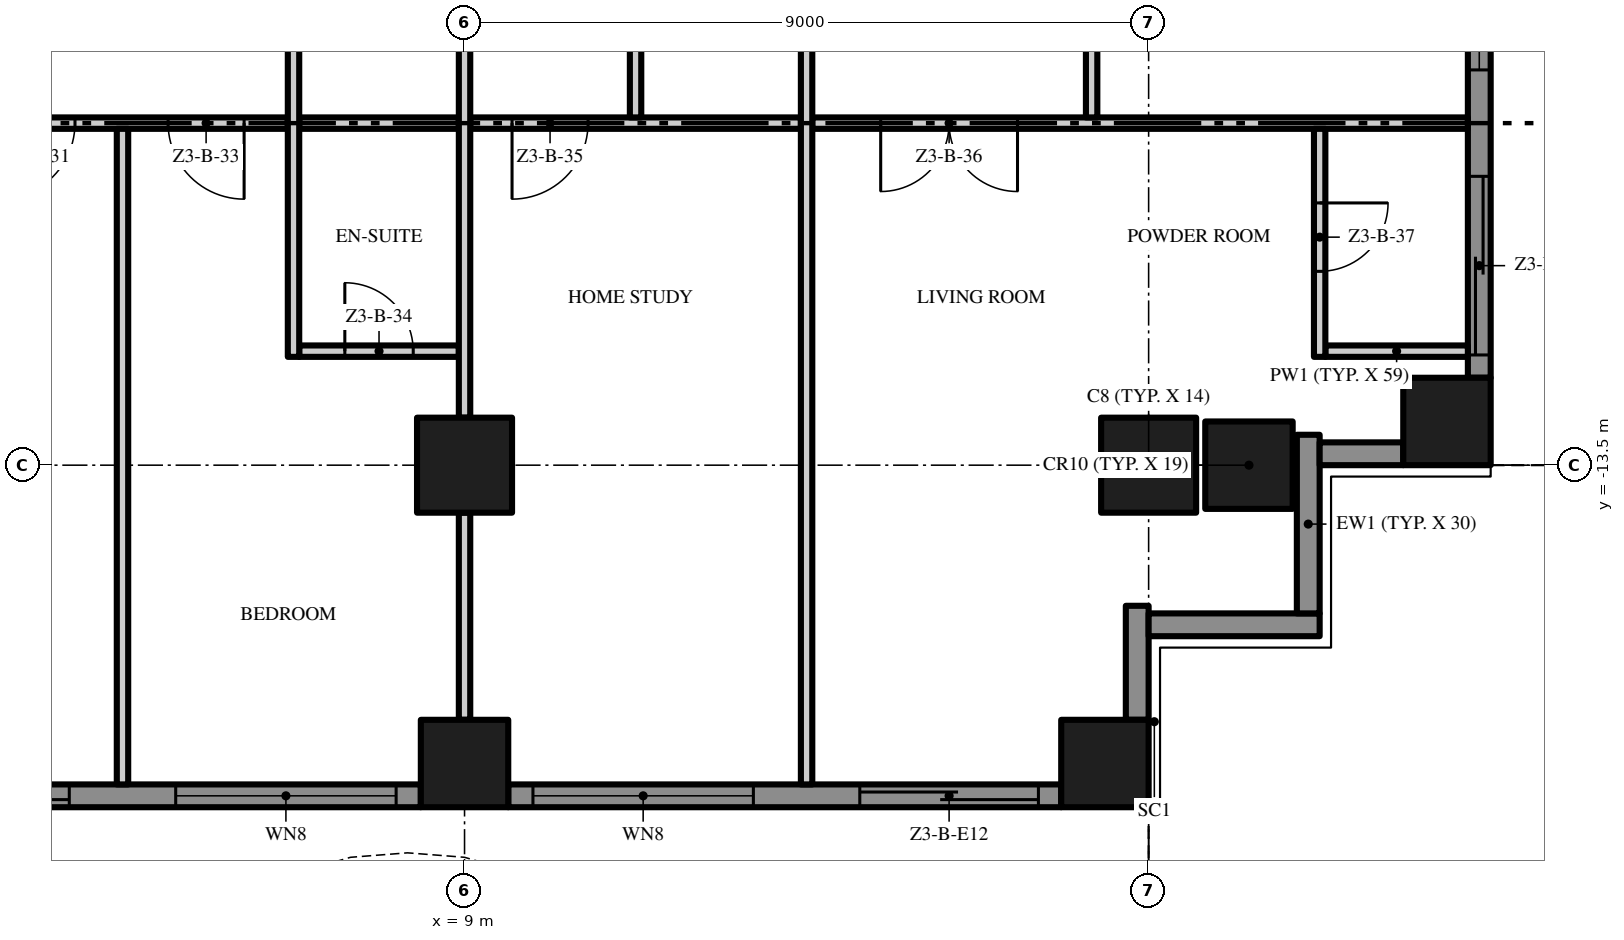
"""IFC4 building model, lengths in metres.
Left out: names, types, materials, properties, quantities, classifications, styles, units other than length and angle.
Written with IfcOpenShell. Run it as: python <this file> out.ifc"""

import sys

from ifc_helpers import new_model, si_unit, direction, frame, frame_2d, origin, origin_2d, place, context, subcontext, project, spatial, polyline, rectangle, outline, extrude, element, fill, save


model = new_model("IFC4")
c1 = context("Model", 3, precision=1e-05, world=origin(), true_north=direction((0.0, 1.0)))
c2 = subcontext(c1, "Body", "Model", "MODEL_VIEW")
j1 = project(units=[si_unit("LENGTHUNIT", "METRE"), si_unit("PLANEANGLEUNIT", "RADIAN")], contexts=[c1])
p1 = place(None, origin())
s1 = spatial("IfcSite", under=j1, at=p1, CompositionType="ELEMENT")
p2 = place(p1, origin())
s2 = spatial("IfcBuilding", under=s1, at=p2, CompositionType="ELEMENT")
p3 = place(p2, frame((0.0, 0.0, 144.0)))
s3 = spatial("IfcBuildingStorey", under=s2, at=p3, CompositionType="ELEMENT", Elevation=144.0)
p4 = place(p3, frame((18.0, -13.5, 0.0), z_axis=(0.0, 0.0, 1.0), x_axis=(1.0, 0.0, 0.0)))
e1 = element("IfcColumn", 1, at=p4, inside=s3, PredefinedType="COLUMN", context=c2, shape_type="SweptSolid", body=[
    extrude(rectangle(XDim=1.25, YDim=1.25, at=origin_2d()), origin(), (0.0, 0.0, 1.0), 3.5),
])
for number, where, z_axis, x_axis in (
    (2, (17.425, -17.425, 0.0), (0.0, 0.0, 1.0), (1.0, 0.0, 0.0)),
    (3, (21.925, -12.925, 0.0), (0.0, 0.0, 1.0), (1.0, 0.0, 0.0)),
    (4, (19.32, -13.5, 0.0), (0.0, 0.0, 1.0), (1.0, 0.0, 0.0)),
):
    element("IfcColumn", number, at=place(p3, frame(where, z_axis=z_axis, x_axis=x_axis)), inside=s3, PredefinedType="COLUMN", context=c2, shape_type="SweptSolid", body=[
        extrude(rectangle(XDim=1.15, YDim=1.15, at=origin_2d()), origin(), (0.0, 0.0, 1.0), 3.5),
    ])
p5 = place(p3, frame((9.0, -13.5, 0.0), z_axis=(0.0, 0.0, 1.0), x_axis=(1.0, 0.0, 0.0)))
e5 = element("IfcColumn", 5, at=p5, inside=s3, PredefinedType="COLUMN", context=c2, shape_type="SweptSolid", body=[
    extrude(rectangle(XDim=1.25, YDim=1.25, at=origin_2d()), origin(), (0.0, 0.0, 1.0), 3.5),
])
p6 = place(p3, frame((9.0, -17.425, 0.0), z_axis=(0.0, 0.0, 1.0), x_axis=(1.0, 0.0, 0.0)))
e6 = element("IfcColumn", 6, at=p6, inside=s3, PredefinedType="COLUMN", context=c2, shape_type="SweptSolid", body=[
    extrude(rectangle(XDim=1.15, YDim=1.15, at=origin_2d()), origin(), (0.0, 0.0, 1.0), 3.5),
])
p7 = place(p3, frame((8.425, -17.85, 0.0), z_axis=(0.0, 0.0, 1.0), x_axis=(-1.0, 0.0, 0.0)))
e7 = element("IfcWall", 7, at=p7, inside=s3, PredefinedType="SOLIDWALL", context=c2, shape_type="SweptSolid", body=[
    extrude(rectangle(XDim=7.85, YDim=0.3, at=frame_2d((3.925, 0.0))), origin(), (0.0, 0.0, 1.0), 3.5),
])
p8 = place(p7, frame((4.625, 0.0, 0.0)))
e8 = element("IfcOpeningElement", 8, at=p8, cuts=e7, PredefinedType="OPENING", context=c2, shape_type="SweptSolid", body=[
    extrude(rectangle(XDim=2.9, YDim=2.4, at=frame_2d((1.45, 1.2))), frame((0.0, 0.16, 0.0), z_axis=(0.0, -1.0, 0.0), x_axis=(1.0, 0.0, 0.0)), (0.0, 0.0, 1.0), 0.32),
])
p9 = place(p7, frame((0.325, 0.0, 0.45)))
e9 = element("IfcOpeningElement", 9, at=p9, cuts=e7, PredefinedType="OPENING", context=c2, shape_type="SweptSolid", body=[
    extrude(rectangle(XDim=2.9, YDim=2.65, at=frame_2d((1.45, 1.325))), frame((0.0, 0.16, 0.0), z_axis=(0.0, -1.0, 0.0), x_axis=(1.0, 0.0, 0.0)), (0.0, 0.0, 1.0), 0.32),
])
p10 = place(p3, frame((16.85, -17.85, 0.0), z_axis=(0.0, 0.0, 1.0), x_axis=(-1.0, 0.0, 0.0)))
e10 = element("IfcWall", 10, at=p10, inside=s3, PredefinedType="SOLIDWALL", context=c2, shape_type="SweptSolid", body=[
    extrude(rectangle(XDim=7.275, YDim=0.3, at=frame_2d((3.638, 0.0))), origin(), (0.0, 0.0, 1.0), 3.5),
])
p11 = place(p10, frame((4.05, 0.0, 0.45)))
e11 = element("IfcOpeningElement", 11, at=p11, cuts=e10, PredefinedType="OPENING", context=c2, shape_type="SweptSolid", body=[
    extrude(rectangle(XDim=2.9, YDim=2.65, at=frame_2d((1.45, 1.325))), frame((0.0, 0.16, 0.0), z_axis=(0.0, -1.0, 0.0), x_axis=(1.0, 0.0, 0.0)), (0.0, 0.0, 1.0), 0.32),
])
p12 = place(p10, frame((0.3, 0.0, 0.0)))
e12 = element("IfcOpeningElement", 12, at=p12, cuts=e10, PredefinedType="OPENING", context=c2, shape_type="SweptSolid", body=[
    extrude(rectangle(XDim=2.35, YDim=2.4, at=frame_2d((1.175, 1.2))), frame((0.0, 0.16, 0.0), z_axis=(0.0, -1.0, 0.0), x_axis=(1.0, 0.0, 0.0)), (0.0, 0.0, 1.0), 0.32),
])
p13 = place(p3, frame((17.85, -15.35, 0.0), z_axis=(0.0, 0.0, 1.0), x_axis=(0.0, -1.0, 0.0)))
e13 = element("IfcWall", 13, at=p13, inside=s3, PredefinedType="SOLIDWALL", context=c2, shape_type="SweptSolid", body=[
    extrude(rectangle(XDim=1.5, YDim=0.3, at=frame_2d((0.75, 0.0))), origin(), (0.0, 0.0, 1.0), 3.5),
])
p14 = place(p3, frame((20.25, -15.6, 0.0), z_axis=(0.0, 0.0, 1.0), x_axis=(-1.0, 0.0, 0.0)))
e14 = element("IfcWall", 14, at=p14, inside=s3, PredefinedType="SOLIDWALL", context=c2, shape_type="SweptSolid", body=[
    extrude(rectangle(XDim=2.25, YDim=0.3, at=frame_2d((1.125, 0.0))), origin(), (0.0, 0.0, 1.0), 3.5),
])
p15 = place(p3, frame((20.1, -13.1, 0.0), z_axis=(0.0, 0.0, 1.0), x_axis=(0.0, -1.0, 0.0)))
e15 = element("IfcWall", 15, at=p15, inside=s3, PredefinedType="SOLIDWALL", context=c2, shape_type="SweptSolid", body=[
    extrude(rectangle(XDim=2.35, YDim=0.3, at=frame_2d((1.175, 0.0))), origin(), (0.0, 0.0, 1.0), 3.5),
])
p16 = place(p3, frame((21.35, -13.35, 0.0), z_axis=(0.0, 0.0, 1.0), x_axis=(-1.0, 0.0, 0.0)))
e16 = element("IfcWall", 16, at=p16, inside=s3, PredefinedType="SOLIDWALL", context=c2, shape_type="SweptSolid", body=[
    extrude(rectangle(XDim=1.1, YDim=0.3, at=frame_2d((0.55, 0.0))), origin(), (0.0, 0.0, 1.0), 3.5),
])
p17 = place(p3, frame((22.35, -5.075, 0.0), z_axis=(0.0, 0.0, 1.0), x_axis=(0.0, -1.0, 0.0)))
e17 = element("IfcWall", 17, at=p17, inside=s3, PredefinedType="SOLIDWALL", context=c2, shape_type="SweptSolid", body=[
    extrude(rectangle(XDim=7.275, YDim=0.3, at=frame_2d((3.638, 0.0))), origin(), (0.0, 0.0, 1.0), 3.5),
])
p18 = place(p17, frame((4.625, 0.0, 0.0)))
e18 = element("IfcOpeningElement", 18, at=p18, cuts=e17, PredefinedType="OPENING", context=c2, shape_type="SweptSolid", body=[
    extrude(rectangle(XDim=2.35, YDim=2.4, at=frame_2d((1.175, 1.2))), frame((0.0, 0.16, 0.0), z_axis=(0.0, -1.0, 0.0), x_axis=(1.0, 0.0, 0.0)), (0.0, 0.0, 1.0), 0.32),
])
p19 = place(p17, frame((0.325, 0.0, 0.45)))
e19 = element("IfcOpeningElement", 19, at=p19, cuts=e17, PredefinedType="OPENING", context=c2, shape_type="SweptSolid", body=[
    extrude(rectangle(XDim=2.9, YDim=2.65, at=frame_2d((1.45, 1.325))), frame((0.0, 0.16, 0.0), z_axis=(0.0, -1.0, 0.0), x_axis=(1.0, 0.0, 0.0)), (0.0, 0.0, 1.0), 0.32),
])
p20 = place(p3, origin())
e20 = element("IfcWall", 20, at=p20, inside=s3, PredefinedType="USERDEFINED", context=c2, shape_type="SweptSolid", body=[
    extrude(outline(polyline([(-18.0, -19.8), (-16.5, -20.505), (-15.0, -20.941), (-14.25, -21.0), (-13.5, -20.941), (-12.0, -20.505), (-10.5, -19.8), (-9.0, -19.095), (-7.5, -18.659), (-6.75, -18.6), (-6.0, -18.659), (-4.5, -19.095), (-3.0, -19.8), (-1.5, -20.505), (0.0, -20.941), (0.75, -21.0), (1.5, -20.941), (3.0, -20.505), (4.5, -19.8), (6.0, -19.095), (7.5, -18.659), (8.25, -18.6), (9.0, -18.659), (10.5, -19.095), (12.0, -19.8), (13.5, -20.505), (15.0, -20.941), (15.75, -21.0), (16.5, -20.941), (18.0, -20.505), (17.93, -20.265), (16.455, -20.694), (15.75, -20.749), (15.045, -20.694), (13.589, -20.271), (12.106, -19.574), (10.589, -18.86), (9.045, -18.411), (8.25, -18.349), (7.455, -18.411), (5.911, -18.86), (4.394, -19.574), (2.911, -20.271), (1.455, -20.694), (0.75, -20.749), (0.045, -20.694), (-1.411, -20.271), (-2.894, -19.574), (-4.411, -18.86), (-5.955, -18.411), (-6.75, -18.349), (-7.545, -18.411), (-9.089, -18.86), (-10.606, -19.574), (-12.089, -20.271), (-13.545, -20.694), (-14.25, -20.749), (-14.955, -20.694), (-16.411, -20.271), (-17.894, -19.574), (-18.0, -19.8)])), origin(), (0.0, 0.0, 1.0), 0.9),
])
p21 = place(p3, origin())
e21 = element("IfcWall", 21, at=p21, inside=s3, PredefinedType="USERDEFINED", context=c2, shape_type="SweptSolid", body=[
    extrude(outline(polyline([(24.3, -13.5), (25.005, -12.0), (25.441, -10.5), (25.5, -9.75), (25.441, -9.0), (25.005, -7.5), (24.3, -6.0), (23.595, -4.5), (23.159, -3.0), (23.1, -2.25), (23.159, -1.5), (23.595, 0.0), (24.3, 1.5), (25.005, 3.0), (25.441, 4.5), (25.5, 5.25), (25.441, 6.0), (25.005, 7.5), (24.3, 9.0), (23.595, 10.5), (23.159, 12.0), (23.1, 12.75), (23.159, 13.5), (23.595, 15.0), (24.3, 16.5), (25.005, 18.0), (24.779, 18.106), (24.074, 16.606), (23.36, 15.089), (22.911, 13.545), (22.849, 12.75), (22.911, 11.955), (23.36, 10.411), (24.074, 8.894), (24.771, 7.411), (25.194, 5.955), (25.249, 5.25), (25.194, 4.545), (24.771, 3.089), (24.074, 1.606), (23.36, 0.089), (22.911, -1.455), (22.849, -2.25), (22.911, -3.045), (23.36, -4.589), (24.074, -6.106), (24.771, -7.589), (25.194, -9.045), (25.249, -9.75), (25.194, -10.455), (24.771, -11.911), (24.074, -13.394), (24.3, -13.5)])), origin(), (0.0, 0.0, 1.0), 0.9),
])
p22 = place(p3, frame((6.825, -12.0, 0.0), z_axis=(0.0, 0.0, 1.0), x_axis=(1.0, 0.0, 0.0)))
e22 = element("IfcWall", 22, at=p22, inside=s3, PredefinedType="PARTITIONING", context=c2, shape_type="SweptSolid", body=[
    extrude(rectangle(XDim=2.1, YDim=0.15, at=frame_2d((1.05, 0.0))), origin(), (0.0, 0.0, 1.0), 3.5),
])
p23 = place(p22, frame((0.6, 0.0, 0.0)))
e23 = element("IfcOpeningElement", 23, at=p23, cuts=e22, PredefinedType="OPENING", context=c2, shape_type="SweptSolid", body=[
    extrude(rectangle(XDim=0.9, YDim=2.1, at=frame_2d((0.45, 1.05))), frame((0.0, 0.085, 0.0), z_axis=(0.0, -1.0, 0.0), x_axis=(1.0, 0.0, 0.0)), (0.0, 0.0, 1.0), 0.17),
])
p24 = place(p3, frame((20.325, -12.0, 0.0), z_axis=(0.0, 0.0, 1.0), x_axis=(1.0, 0.0, 0.0)))
e24 = element("IfcWall", 24, at=p24, inside=s3, PredefinedType="PARTITIONING", context=c2, shape_type="SweptSolid", body=[
    extrude(rectangle(XDim=1.875, YDim=0.15, at=frame_2d((0.938, 0.0))), origin(), (0.0, 0.0, 1.0), 3.5),
])
p25 = place(p3, frame((6.675, -9.0, 0.0), z_axis=(0.0, 0.0, 1.0), x_axis=(-1.0, 0.0, 0.0)))
e25 = element("IfcWall", 25, at=p25, inside=s3, PredefinedType="PARTITIONING", context=c2, shape_type="SweptSolid", body=[
    extrude(rectangle(XDim=4.35, YDim=0.15, at=frame_2d((2.175, 0.0))), origin(), (0.0, 0.0, 1.0), 3.5),
])
p26 = place(p25, frame((2.8, 0.0, 0.0)))
e26 = element("IfcOpeningElement", 26, at=p26, cuts=e25, PredefinedType="OPENING", context=c2, shape_type="SweptSolid", body=[
    extrude(rectangle(XDim=1.0, YDim=2.4, at=frame_2d((0.5, 1.2))), frame((0.0, 0.085, 0.0), z_axis=(0.0, -1.0, 0.0), x_axis=(1.0, 0.0, 0.0)), (0.0, 0.0, 1.0), 0.17),
])
p27 = place(p25, frame((0.575, 0.0, 0.0)))
e27 = element("IfcOpeningElement", 27, at=p27, cuts=e25, PredefinedType="OPENING", context=c2, shape_type="SweptSolid", body=[
    extrude(rectangle(XDim=1.0, YDim=2.4, at=frame_2d((0.5, 1.2))), frame((0.0, 0.085, 0.0), z_axis=(0.0, -1.0, 0.0), x_axis=(1.0, 0.0, 0.0)), (0.0, 0.0, 1.0), 0.17),
])
p28 = place(p3, frame((6.825, -9.0, 0.0), z_axis=(0.0, 0.0, 1.0), x_axis=(1.0, 0.0, 0.0)))
e28 = element("IfcWall", 28, at=p28, inside=s3, PredefinedType="PARTITIONING", context=c2, shape_type="SweptSolid", body=[
    extrude(rectangle(XDim=2.1, YDim=0.15, at=frame_2d((1.05, 0.0))), origin(), (0.0, 0.0, 1.0), 3.5),
])
p29 = place(p3, frame((13.425, -9.0, 0.0), z_axis=(0.0, 0.0, 1.0), x_axis=(-1.0, 0.0, 0.0)))
e29 = element("IfcWall", 29, at=p29, inside=s3, PredefinedType="PARTITIONING", context=c2, shape_type="SweptSolid", body=[
    extrude(rectangle(XDim=4.35, YDim=0.15, at=frame_2d((2.175, 0.0))), origin(), (0.0, 0.0, 1.0), 3.5),
])
p30 = place(p29, frame((2.8, 0.0, 0.0)))
e30 = element("IfcOpeningElement", 30, at=p30, cuts=e29, PredefinedType="OPENING", context=c2, shape_type="SweptSolid", body=[
    extrude(rectangle(XDim=1.0, YDim=2.4, at=frame_2d((0.5, 1.2))), frame((0.0, 0.085, 0.0), z_axis=(0.0, -1.0, 0.0), x_axis=(1.0, 0.0, 0.0)), (0.0, 0.0, 1.0), 0.17),
])
p31 = place(p3, frame((22.2, -9.0, 0.0), z_axis=(0.0, 0.0, 1.0), x_axis=(-1.0, 0.0, 0.0)))
e31 = element("IfcWall", 31, at=p31, inside=s3, PredefinedType="PARTITIONING", context=c2, shape_type="SweptSolid", body=[
    extrude(rectangle(XDim=8.625, YDim=0.15, at=frame_2d((4.312, 0.0))), origin(), (0.0, 0.0, 1.0), 3.5),
])
p32 = place(p31, frame((5.925, 0.0, 0.0)))
e32 = element("IfcOpeningElement", 32, at=p32, cuts=e31, PredefinedType="OPENING", context=c2, shape_type="SweptSolid", body=[
    extrude(rectangle(XDim=1.8, YDim=2.4, at=frame_2d((0.9, 1.2))), frame((0.0, 0.085, 0.0), z_axis=(0.0, -1.0, 0.0), x_axis=(1.0, 0.0, 0.0)), (0.0, 0.0, 1.0), 0.17),
])
p33 = place(p3, frame((4.5, -17.7, 0.0), z_axis=(0.0, 0.0, 1.0), x_axis=(0.0, 1.0, 0.0)))
e33 = element("IfcWall", 33, at=p33, inside=s3, PredefinedType="PARTITIONING", context=c2, shape_type="SweptSolid", body=[
    extrude(rectangle(XDim=8.625, YDim=0.15, at=frame_2d((4.312, 0.0))), origin(), (0.0, 0.0, 1.0), 3.5),
])
p34 = place(p3, frame((6.75, -12.075, 0.0), z_axis=(0.0, 0.0, 1.0), x_axis=(0.0, 1.0, 0.0)))
e34 = element("IfcWall", 34, at=p34, inside=s3, PredefinedType="PARTITIONING", context=c2, shape_type="SweptSolid", body=[
    extrude(rectangle(XDim=7.65, YDim=0.15, at=frame_2d((3.825, 0.0))), origin(), (0.0, 0.0, 1.0), 3.5),
])
p35 = place(p3, frame((9.0, -16.85, 0.0), z_axis=(0.0, 0.0, 1.0), x_axis=(0.0, 1.0, 0.0)))
e35 = element("IfcWall", 35, at=p35, inside=s3, PredefinedType="PARTITIONING", context=c2, shape_type="SweptSolid", body=[
    extrude(rectangle(XDim=2.725, YDim=0.15, at=frame_2d((1.363, 0.0))), origin(), (0.0, 0.0, 1.0), 3.5),
])
p36 = place(p3, frame((9.0, -12.875, 0.0), z_axis=(0.0, 0.0, 1.0), x_axis=(0.0, 1.0, 0.0)))
e36 = element("IfcWall", 36, at=p36, inside=s3, PredefinedType="PARTITIONING", context=c2, shape_type="SweptSolid", body=[
    extrude(rectangle(XDim=7.75, YDim=0.15, at=frame_2d((3.875, 0.0))), origin(), (0.0, 0.0, 1.0), 3.5),
])
p37 = place(p3, frame((11.25, -8.925, 0.0), z_axis=(0.0, 0.0, 1.0), x_axis=(0.0, 1.0, 0.0)))
e37 = element("IfcWall", 37, at=p37, inside=s3, PredefinedType="PARTITIONING", context=c2, shape_type="SweptSolid", body=[
    extrude(rectangle(XDim=4.5, YDim=0.15, at=frame_2d((2.25, 0.0))), origin(), (0.0, 0.0, 1.0), 3.5),
])
p38 = place(p3, frame((13.5, -17.7, 0.0), z_axis=(0.0, 0.0, 1.0), x_axis=(0.0, 1.0, 0.0)))
e38 = element("IfcWall", 38, at=p38, inside=s3, PredefinedType="PARTITIONING", context=c2, shape_type="SweptSolid", body=[
    extrude(rectangle(XDim=13.275, YDim=0.15, at=frame_2d((6.638, 0.0))), origin(), (0.0, 0.0, 1.0), 3.5),
])
p39 = place(p3, frame((17.25, -8.925, 0.0), z_axis=(0.0, 0.0, 1.0), x_axis=(0.0, 1.0, 0.0)))
e39 = element("IfcWall", 39, at=p39, inside=s3, PredefinedType="PARTITIONING", context=c2, shape_type="SweptSolid", body=[
    extrude(rectangle(XDim=4.5, YDim=0.15, at=frame_2d((2.25, 0.0))), origin(), (0.0, 0.0, 1.0), 3.5),
])
p40 = place(p3, frame((20.25, -9.075, 0.0), z_axis=(0.0, 0.0, 1.0), x_axis=(0.0, -1.0, 0.0)))
e40 = element("IfcWall", 40, at=p40, inside=s3, PredefinedType="PARTITIONING", context=c2, shape_type="SweptSolid", body=[
    extrude(rectangle(XDim=3.0, YDim=0.15, at=frame_2d((1.5, 0.0))), origin(), (0.0, 0.0, 1.0), 3.5),
])
p41 = place(p40, frame((0.975, 0.0, 0.0)))
e41 = element("IfcOpeningElement", 41, at=p41, cuts=e40, PredefinedType="OPENING", context=c2, shape_type="SweptSolid", body=[
    extrude(rectangle(XDim=0.9, YDim=2.1, at=frame_2d((0.45, 1.05))), frame((0.0, 0.085, 0.0), z_axis=(0.0, -1.0, 0.0), x_axis=(1.0, 0.0, 0.0)), (0.0, 0.0, 1.0), 0.17),
])
p42 = place(p8, origin())
e42 = element("IfcDoor", 42, at=p42, inside=s3, OperationType="SINGLE_SWING_LEFT", PredefinedType="DOOR", context=c2, shape_type="SweptSolid", body=[
    extrude(rectangle(XDim=2.9, YDim=2.4, at=frame_2d((1.45, 1.2))), frame((0.0, 0.025, 0.0), z_axis=(0.0, -1.0, 0.0), x_axis=(1.0, 0.0, 0.0)), (0.0, 0.0, 1.0), 0.05),
])
fill(e8, e42)
p43 = place(p9, origin())
e43 = element("IfcWindow", 43, at=p43, inside=s3, PartitioningType="SINGLE_PANEL", PredefinedType="WINDOW", context=c2, shape_type="SweptSolid", body=[
    extrude(rectangle(XDim=2.9, YDim=2.65, at=frame_2d((1.45, 1.325))), frame((0.0, 0.03, 0.0), z_axis=(0.0, -1.0, 0.0), x_axis=(1.0, 0.0, 0.0)), (0.0, 0.0, 1.0), 0.06),
])
fill(e9, e43)
p44 = place(p11, origin())
e44 = element("IfcWindow", 44, at=p44, inside=s3, PartitioningType="SINGLE_PANEL", PredefinedType="WINDOW", context=c2, shape_type="SweptSolid", body=[
    extrude(rectangle(XDim=2.9, YDim=2.65, at=frame_2d((1.45, 1.325))), frame((0.0, 0.03, 0.0), z_axis=(0.0, -1.0, 0.0), x_axis=(1.0, 0.0, 0.0)), (0.0, 0.0, 1.0), 0.06),
])
fill(e11, e44)
p45 = place(p12, origin())
e45 = element("IfcDoor", 45, at=p45, inside=s3, OperationType="SINGLE_SWING_LEFT", PredefinedType="DOOR", context=c2, shape_type="SweptSolid", body=[
    extrude(rectangle(XDim=2.35, YDim=2.4, at=frame_2d((1.175, 1.2))), frame((0.0, 0.025, 0.0), z_axis=(0.0, -1.0, 0.0), x_axis=(1.0, 0.0, 0.0)), (0.0, 0.0, 1.0), 0.05),
])
fill(e12, e45)
p46 = place(p18, origin())
e46 = element("IfcDoor", 46, at=p46, inside=s3, OperationType="SINGLE_SWING_LEFT", PredefinedType="DOOR", context=c2, shape_type="SweptSolid", body=[
    extrude(rectangle(XDim=2.35, YDim=2.4, at=frame_2d((1.175, 1.2))), frame((0.0, 0.025, 0.0), z_axis=(0.0, -1.0, 0.0), x_axis=(1.0, 0.0, 0.0)), (0.0, 0.0, 1.0), 0.05),
])
fill(e18, e46)
p47 = place(p19, origin())
e47 = element("IfcWindow", 47, at=p47, inside=s3, PartitioningType="SINGLE_PANEL", PredefinedType="WINDOW", context=c2, shape_type="SweptSolid", body=[
    extrude(rectangle(XDim=2.9, YDim=2.65, at=frame_2d((1.45, 1.325))), frame((0.0, 0.03, 0.0), z_axis=(0.0, -1.0, 0.0), x_axis=(1.0, 0.0, 0.0)), (0.0, 0.0, 1.0), 0.06),
])
fill(e19, e47)
p48 = place(p26, origin())
e48 = element("IfcDoor", 48, at=p48, inside=s3, OperationType="SINGLE_SWING_RIGHT", PredefinedType="DOOR", context=c2, shape_type="SweptSolid", body=[
    extrude(rectangle(XDim=1.0, YDim=2.4, at=frame_2d((0.5, 1.2))), frame((0.0, 0.025, 0.0), z_axis=(0.0, -1.0, 0.0), x_axis=(1.0, 0.0, 0.0)), (0.0, 0.0, 1.0), 0.05),
])
fill(e26, e48)
p49 = place(p27, origin())
e49 = element("IfcDoor", 49, at=p49, inside=s3, OperationType="SINGLE_SWING_LEFT", PredefinedType="DOOR", context=c2, shape_type="SweptSolid", body=[
    extrude(rectangle(XDim=1.0, YDim=2.4, at=frame_2d((0.5, 1.2))), frame((0.0, 0.025, 0.0), z_axis=(0.0, -1.0, 0.0), x_axis=(1.0, 0.0, 0.0)), (0.0, 0.0, 1.0), 0.05),
])
fill(e27, e49)
p50 = place(p23, origin())
e50 = element("IfcDoor", 50, at=p50, inside=s3, OperationType="SINGLE_SWING_LEFT", PredefinedType="DOOR", context=c2, shape_type="SweptSolid", body=[
    extrude(rectangle(XDim=0.9, YDim=2.1, at=frame_2d((0.45, 1.05))), frame((0.0, 0.025, 0.0), z_axis=(0.0, -1.0, 0.0), x_axis=(1.0, 0.0, 0.0)), (0.0, 0.0, 1.0), 0.05),
])
fill(e23, e50)
p51 = place(p30, origin())
e51 = element("IfcDoor", 51, at=p51, inside=s3, OperationType="SINGLE_SWING_RIGHT", PredefinedType="DOOR", context=c2, shape_type="SweptSolid", body=[
    extrude(rectangle(XDim=1.0, YDim=2.4, at=frame_2d((0.5, 1.2))), frame((0.0, 0.025, 0.0), z_axis=(0.0, -1.0, 0.0), x_axis=(1.0, 0.0, 0.0)), (0.0, 0.0, 1.0), 0.05),
])
fill(e30, e51)
p52 = place(p32, origin())
e52 = element("IfcDoor", 52, at=p52, inside=s3, OperationType="DOUBLE_DOOR_SINGLE_SWING", PredefinedType="DOOR", context=c2, shape_type="SweptSolid", body=[
    extrude(rectangle(XDim=1.8, YDim=2.4, at=frame_2d((0.9, 1.2))), frame((0.0, 0.025, 0.0), z_axis=(0.0, -1.0, 0.0), x_axis=(1.0, 0.0, 0.0)), (0.0, 0.0, 1.0), 0.05),
])
fill(e32, e52)
p53 = place(p41, origin())
e53 = element("IfcDoor", 53, at=p53, inside=s3, OperationType="SINGLE_SWING_LEFT", PredefinedType="DOOR", context=c2, shape_type="SweptSolid", body=[
    extrude(rectangle(XDim=0.9, YDim=2.1, at=frame_2d((0.45, 1.05))), frame((0.0, 0.025, 0.0), z_axis=(0.0, -1.0, 0.0), x_axis=(1.0, 0.0, 0.0)), (0.0, 0.0, 1.0), 0.05),
])
fill(e41, e53)
save(model, sys.argv[1])
